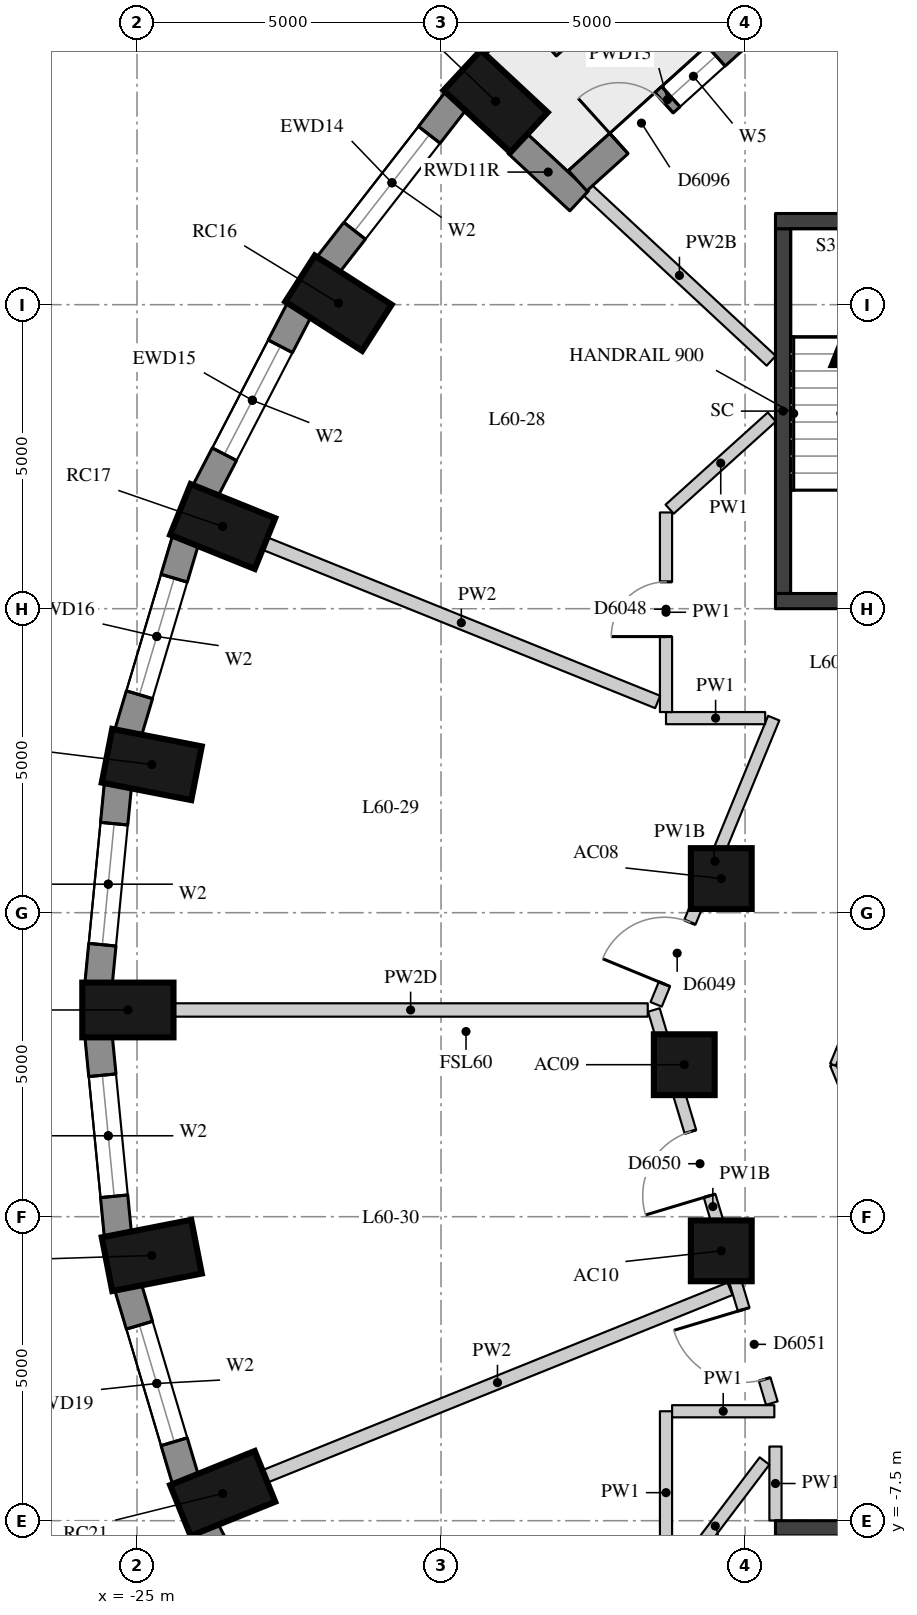
"""IFC4 building model, lengths in metres.
Left out: names, types, materials, properties, quantities, classifications, styles, units other than length and angle.
Written with IfcOpenShell. Run it as: python <this file> out.ifc"""

import sys

from ifc_helpers import new_model, si_unit, direction, frame, frame_2d, origin, origin_2d, place, context, subcontext, project, spatial, rectangle, extrude, element, fill, save


model = new_model("IFC4")
c1 = context("Model", 3, precision=1e-05, world=origin(), true_north=direction((0.0, 1.0)))
c2 = subcontext(c1, "Body", "Model", "MODEL_VIEW")
j1 = project(units=[si_unit("LENGTHUNIT", "METRE"), si_unit("PLANEANGLEUNIT", "RADIAN")], contexts=[c1])
p1 = place(None, origin())
s1 = spatial("IfcSite", under=j1, at=p1, CompositionType="ELEMENT")
p2 = place(p1, origin())
s2 = spatial("IfcBuilding", under=s1, at=p2, CompositionType="ELEMENT")
p3 = place(p2, frame((0.0, 0.0, 212.3)))
s3 = spatial("IfcBuildingStorey", under=s2, at=p3, CompositionType="ELEMENT", Elevation=212.3)
for number, where, z_axis, x_axis in (
    (1, (-19.102, 15.845, 0.0), (0.0, 0.0, 1.0), (-0.732, 0.681, 0.0)),
    (2, (-21.687, 12.525, 0.0), (0.0, 0.0, 1.0), (-0.842, 0.539, 0.0)),
    (3, (-23.591, 8.852, 0.0), (0.0, 0.0, 1.0), (-0.927, 0.374, 0.0)),
    (4, (-24.757, 4.937, 0.0), (0.0, 0.0, 1.0), (-0.981, 0.192, 0.0)),
    (5, (-25.15, 0.9, 0.0), (0.0, 0.0, 1.0), (-1.0, 0.0, 0.0)),
    (6, (-24.757, -3.137, 0.0), (0.0, 0.0, 1.0), (-0.981, -0.192, 0.0)),
    (7, (-23.591, -7.052, 0.0), (0.0, 0.0, 1.0), (-0.927, -0.374, 0.0)),
):
    element("IfcColumn", number, at=place(p3, frame(where, z_axis=z_axis, x_axis=x_axis)), inside=s3, PredefinedType="COLUMN", context=c2, shape_type="SweptSolid", body=[
        extrude(rectangle(XDim=1.5, YDim=0.9, at=origin_2d()), origin(), (0.0, 0.0, 1.0), 3.3),
    ])
for number, where, z_axis, x_axis in (
    (8, (-15.391, 3.062, 0.0), (0.0, 0.0, 1.0), (1.0, 0.0, 0.0)),
    (9, (-16.0, 0.0, 0.0), (0.0, 0.0, 1.0), (1.0, 0.0, 0.0)),
    (10, (-15.391, -3.062, 0.0), (0.0, 0.0, 1.0), (1.0, 0.0, 0.0)),
):
    element("IfcColumn", number, at=place(p3, frame(where, z_axis=z_axis, x_axis=x_axis)), inside=s3, PredefinedType="COLUMN", context=c2, shape_type="SweptSolid", body=[
        extrude(rectangle(XDim=1.0, YDim=1.0, at=origin_2d()), origin(), (0.0, 0.0, 1.0), 3.3),
    ])
p4 = place(p3, frame((-19.751, 15.861, 0.0), z_axis=(0.0, 0.0, 1.0), x_axis=(-0.614220816451, -0.789134201919, 0.0)))
e11 = element("IfcWall", 11, at=p4, inside=s3, PredefinedType="SOLIDWALL", context=c2, shape_type="SweptSolid", body=[
    extrude(rectangle(XDim=3.438, YDim=0.45, at=frame_2d((1.719, 0.0))), origin(), (0.0, 0.0, 1.0), 3.02),
])
p5 = place(p4, frame((0.719, 0.0, 0.4)))
e12 = element("IfcOpeningElement", 12, at=p5, cuts=e11, PredefinedType="OPENING", context=c2, shape_type="SweptSolid", body=[
    extrude(rectangle(XDim=2.0, YDim=1.75, at=frame_2d((1.0, 0.875))), frame((0.0, 0.235, 0.0), z_axis=(0.0, -1.0, 0.0), x_axis=(1.0, 0.0, 0.0)), (0.0, 0.0, 1.0), 0.47),
])
p6 = place(p3, frame((-22.327, 12.424, 0.0), z_axis=(0.0, 0.0, 1.0), x_axis=(-0.460232593174, -0.887798378113, 0.0)))
e13 = element("IfcWall", 13, at=p6, inside=s3, PredefinedType="SOLIDWALL", context=c2, shape_type="SweptSolid", body=[
    extrude(rectangle(XDim=3.371, YDim=0.45, at=frame_2d((1.685, 0.0))), origin(), (0.0, 0.0, 1.0), 3.02),
])
p7 = place(p6, frame((0.685, 0.0, 0.4)))
e14 = element("IfcOpeningElement", 14, at=p7, cuts=e13, PredefinedType="OPENING", context=c2, shape_type="SweptSolid", body=[
    extrude(rectangle(XDim=2.0, YDim=1.75, at=frame_2d((1.0, 0.875))), frame((0.0, 0.235, 0.0), z_axis=(0.0, -1.0, 0.0), x_axis=(1.0, 0.0, 0.0)), (0.0, 0.0, 1.0), 0.47),
])
p8 = place(p3, frame((-24.2, 8.634, 0.0), z_axis=(0.0, 0.0, 1.0), x_axis=(-0.285444972963, -0.958395099847, 0.0)))
e15 = element("IfcWall", 15, at=p8, inside=s3, PredefinedType="SOLIDWALL", context=c2, shape_type="SweptSolid", body=[
    extrude(rectangle(XDim=3.32, YDim=0.45, at=frame_2d((1.66, 0.0))), origin(), (0.0, 0.0, 1.0), 3.02),
])
p9 = place(p8, frame((0.66, 0.0, 0.4)))
e16 = element("IfcOpeningElement", 16, at=p9, cuts=e15, PredefinedType="OPENING", context=c2, shape_type="SweptSolid", body=[
    extrude(rectangle(XDim=2.0, YDim=1.75, at=frame_2d((1.0, 0.875))), frame((0.0, 0.235, 0.0), z_axis=(0.0, -1.0, 0.0), x_axis=(1.0, 0.0, 0.0)), (0.0, 0.0, 1.0), 0.47),
])
p10 = place(p3, frame((-25.313, 4.608, 0.0), z_axis=(0.0, 0.0, 1.0), x_axis=(-0.096824116835, -0.995301507283, 0.0)))
e17 = element("IfcWall", 17, at=p10, inside=s3, PredefinedType="SOLIDWALL", context=c2, shape_type="SweptSolid", body=[
    extrude(rectangle(XDim=3.293, YDim=0.45, at=frame_2d((1.646, 0.0))), origin(), (0.0, 0.0, 1.0), 3.02),
])
p11 = place(p10, frame((0.646, 0.0, 0.4)))
e18 = element("IfcOpeningElement", 18, at=p11, cuts=e17, PredefinedType="OPENING", context=c2, shape_type="SweptSolid", body=[
    extrude(rectangle(XDim=2.0, YDim=1.75, at=frame_2d((1.0, 0.875))), frame((0.0, 0.235, 0.0), z_axis=(0.0, -1.0, 0.0), x_axis=(1.0, 0.0, 0.0)), (0.0, 0.0, 1.0), 0.47),
])
p12 = place(p3, frame((-25.632, 0.47, 0.0), z_axis=(0.0, 0.0, 1.0), x_axis=(0.096816972749, -0.995302202242, 0.0)))
e19 = element("IfcWall", 19, at=p12, inside=s3, PredefinedType="SOLIDWALL", context=c2, shape_type="SweptSolid", body=[
    extrude(rectangle(XDim=3.293, YDim=0.45, at=frame_2d((1.646, 0.0))), origin(), (0.0, 0.0, 1.0), 3.02),
])
p13 = place(p12, frame((0.646, 0.0, 0.4)))
e20 = element("IfcOpeningElement", 20, at=p13, cuts=e19, PredefinedType="OPENING", context=c2, shape_type="SweptSolid", body=[
    extrude(rectangle(XDim=2.0, YDim=1.75, at=frame_2d((1.0, 0.875))), frame((0.0, 0.235, 0.0), z_axis=(0.0, -1.0, 0.0), x_axis=(1.0, 0.0, 0.0)), (0.0, 0.0, 1.0), 0.47),
])
p14 = place(p3, frame((-25.148, -3.652, 0.0), z_axis=(0.0, 0.0, 1.0), x_axis=(0.285444972963, -0.958395099847, 0.0)))
e21 = element("IfcWall", 21, at=p14, inside=s3, PredefinedType="SOLIDWALL", context=c2, shape_type="SweptSolid", body=[
    extrude(rectangle(XDim=3.32, YDim=0.45, at=frame_2d((1.66, 0.0))), origin(), (0.0, 0.0, 1.0), 3.02),
])
p15 = place(p14, frame((0.66, 0.0, 0.4)))
e22 = element("IfcOpeningElement", 22, at=p15, cuts=e21, PredefinedType="OPENING", context=c2, shape_type="SweptSolid", body=[
    extrude(rectangle(XDim=2.0, YDim=1.75, at=frame_2d((1.0, 0.875))), frame((0.0, 0.235, 0.0), z_axis=(0.0, -1.0, 0.0), x_axis=(1.0, 0.0, 0.0)), (0.0, 0.0, 1.0), 0.47),
])
p16 = place(p3, frame((-23.878, -7.632, 0.0), z_axis=(0.0, 0.0, 1.0), x_axis=(0.460232593174, -0.887798378113, 0.0)))
e23 = element("IfcWall", 23, at=p16, inside=s3, PredefinedType="SOLIDWALL", context=c2, shape_type="SweptSolid", body=[
    extrude(rectangle(XDim=3.371, YDim=0.45, at=frame_2d((1.685, 0.0))), origin(), (0.0, 0.0, 1.0), 3.02),
])
p17 = place(p16, frame((0.685, 0.0, 0.4)))
e24 = element("IfcOpeningElement", 24, at=p17, cuts=e23, PredefinedType="OPENING", context=c2, shape_type="SweptSolid", body=[
    extrude(rectangle(XDim=2.0, YDim=1.75, at=frame_2d((1.0, 0.875))), frame((0.0, 0.235, 0.0), z_axis=(0.0, -1.0, 0.0), x_axis=(1.0, 0.0, 0.0)), (0.0, 0.0, 1.0), 0.47),
])
p18 = place(p3, frame((-18.747, 15.155, 0.0), z_axis=(0.0, 0.0, 1.0), x_axis=(0.732349544388, -0.680928883831, 0.0)))
e25 = element("IfcWall", 25, at=p18, inside=s3, PredefinedType="SOLIDWALL", context=c2, shape_type="SweptSolid", body=[
    extrude(rectangle(XDim=1.391, YDim=0.45, at=frame_2d((0.696, 0.0))), origin(), (0.0, 0.0, 1.0), 2.57),
])
p19 = place(p3, frame((-14.799, 17.205, 0.0), z_axis=(0.0, 0.0, 1.0), x_axis=(-0.742488361714, -0.669858964798, 0.0)))
e26 = element("IfcWall", 26, at=p19, inside=s3, PredefinedType="SOLIDWALL", context=c2, shape_type="SweptSolid", body=[
    extrude(rectangle(XDim=3.98, YDim=0.45, at=frame_2d((1.99, 0.0))), origin(), (0.0, 0.0, 1.0), 3.02),
])
p20 = place(p19, frame((0.915, 0.0, 0.4)))
e27 = element("IfcOpeningElement", 27, at=p20, cuts=e26, PredefinedType="OPENING", context=c2, shape_type="SweptSolid", body=[
    extrude(rectangle(XDim=1.0, YDim=1.75, at=frame_2d((0.5, 0.875))), frame((0.0, 0.235, 0.0), z_axis=(0.0, -1.0, 0.0), x_axis=(1.0, 0.0, 0.0)), (0.0, 0.0, 1.0), 0.47),
])
p21 = place(p19, frame((2.065, 0.0, 0.0)))
e28 = element("IfcOpeningElement", 28, at=p21, cuts=e26, PredefinedType="OPENING", context=c2, shape_type="SweptSolid", body=[
    extrude(rectangle(XDim=1.0, YDim=2.15, at=frame_2d((0.5, 1.075))), frame((0.0, 0.235, 0.0), z_axis=(0.0, -1.0, 0.0), x_axis=(1.0, 0.0, 0.0)), (0.0, 0.0, 1.0), 0.47),
])
p22 = place(p3, frame((-17.0, 18.055, 0.0), z_axis=(0.0, 0.0, 1.0), x_axis=(-0.743422275143, -0.668822338758, 0.0)))
e29 = element("IfcWall", 29, at=p22, inside=s3, PredefinedType="USERDEFINED", context=c2, shape_type="SweptSolid", body=[
    extrude(rectangle(XDim=1.8, YDim=0.7, at=frame_2d((0.9, 0.0))), origin(), (0.0, 0.0, 1.0), 0.75),
])
p23 = place(p3, frame((-14.375, 7.75, -0.28), z_axis=(0.0, 0.0, 1.0), x_axis=(0.0, 1.0, 0.0)))
e30 = element("IfcWall", 30, at=p23, inside=s3, PredefinedType="SHEAR", context=c2, shape_type="SweptSolid", body=[
    extrude(rectangle(XDim=6.0, YDim=0.25, at=frame_2d((3.0, 0.0))), origin(), (0.0, 0.0, 1.0), 3.3),
])
for number, where, z_axis, x_axis in (
    (31, (-14.5, 13.875, -0.28), (0.0, 0.0, 1.0), (1.0, 0.0, 0.0)),
    (32, (-14.5, 7.625, -0.28), (0.0, 0.0, 1.0), (1.0, 0.0, 0.0)),
    (33, (-14.5, -7.625, -0.28), (0.0, 0.0, 1.0), (1.0, 0.0, 0.0)),
):
    element("IfcWall", number, at=place(p3, frame(where, z_axis=z_axis, x_axis=x_axis)), inside=s3, PredefinedType="SHEAR", context=c2, shape_type="SweptSolid", body=[
        extrude(rectangle(XDim=5.2, YDim=0.25, at=frame_2d((2.6, 0.0))), origin(), (0.0, 0.0, 1.0), 3.3),
    ])
p24 = place(p3, frame((-14.5, -7.496, 0.0), z_axis=(0.0, 0.0, 1.0), x_axis=(0.0, 1.0, 0.0)))
e34 = element("IfcWall", 34, at=p24, inside=s3, PredefinedType="PARTITIONING", context=c2, shape_type="SweptSolid", body=[
    extrude(rectangle(XDim=1.216, YDim=0.2, at=frame_2d((0.608, 0.0))), origin(), (0.0, 0.0, 1.0), 3.02),
])
p25 = place(p3, frame((-14.679, -6.518, 0.0), z_axis=(0.0, 0.0, 1.0), x_axis=(-0.603820908912, -0.797120009761, 0.0)))
e35 = element("IfcWall", 35, at=p25, inside=s3, PredefinedType="PARTITIONING", context=c2, shape_type="SweptSolid", body=[
    extrude(rectangle(XDim=2.684, YDim=0.2, at=frame_2d((1.342, 0.0))), origin(), (0.0, 0.0, 1.0), 3.02),
])
p26 = place(p3, frame((-16.3, -8.377, 0.0), z_axis=(0.0, 0.0, 1.0), x_axis=(0.0, 1.0, 0.0)))
e36 = element("IfcWall", 36, at=p26, inside=s3, PredefinedType="PARTITIONING", context=c2, shape_type="SweptSolid", body=[
    extrude(rectangle(XDim=2.677, YDim=0.2, at=frame_2d((1.339, 0.0))), origin(), (0.0, 0.0, 1.0), 3.02),
])
p27 = place(p3, frame((-16.2, -5.7, 0.0), z_axis=(0.0, 0.0, 1.0), x_axis=(1.0, 0.0, 0.0)))
e37 = element("IfcWall", 37, at=p27, inside=s3, PredefinedType="PARTITIONING", context=c2, shape_type="SweptSolid", body=[
    extrude(rectangle(XDim=1.681, YDim=0.2, at=frame_2d((0.841, 0.0))), origin(), (0.0, 0.0, 1.0), 3.02),
])
p28 = place(p3, frame((-14.56, -5.567, 0.0), z_axis=(0.0, 0.0, 1.0), x_axis=(-0.287410918602, 0.95780737305, 0.0)))
e38 = element("IfcWall", 38, at=p28, inside=s3, PredefinedType="PARTITIONING", context=c2, shape_type="SweptSolid", body=[
    extrude(rectangle(XDim=6.751, YDim=0.2, at=frame_2d((3.376, 0.0))), origin(), (0.0, 0.0, 1.0), 2.52),
])
p29 = place(p28, frame((3.561, 0.0, 0.0)))
e39 = element("IfcOpeningElement", 39, at=p29, cuts=e38, PredefinedType="OPENING", context=c2, shape_type="SweptSolid", body=[
    extrude(rectangle(XDim=1.1, YDim=2.1, at=frame_2d((0.55, 1.05))), frame((0.0, 0.11, 0.0), z_axis=(0.0, -1.0, 0.0), x_axis=(1.0, 0.0, 0.0)), (0.0, 0.0, 1.0), 0.22),
])
p30 = place(p28, frame((0.41, 0.0, 0.0)))
e40 = element("IfcOpeningElement", 40, at=p30, cuts=e38, PredefinedType="OPENING", context=c2, shape_type="SweptSolid", body=[
    extrude(rectangle(XDim=1.2, YDim=2.1, at=frame_2d((0.6, 1.05))), frame((0.0, 0.11, 0.0), z_axis=(0.0, -1.0, 0.0), x_axis=(1.0, 0.0, 0.0)), (0.0, 0.0, 1.0), 0.22),
])
p31 = place(p3, frame((-16.462, 0.993, 0.0), z_axis=(0.0, 0.0, 1.0), x_axis=(0.37991958703, 0.925019517303, 0.0)))
e41 = element("IfcWall", 41, at=p31, inside=s3, PredefinedType="PARTITIONING", context=c2, shape_type="SweptSolid", body=[
    extrude(rectangle(XDim=5.089, YDim=0.2, at=frame_2d((2.544, 0.0))), origin(), (0.0, 0.0, 1.0), 2.52),
])
p32 = place(p31, frame((0.36, 0.0, 0.0)))
e42 = element("IfcOpeningElement", 42, at=p32, cuts=e41, PredefinedType="OPENING", context=c2, shape_type="SweptSolid", body=[
    extrude(rectangle(XDim=1.1, YDim=2.1, at=frame_2d((0.55, 1.05))), frame((0.0, 0.11, 0.0), z_axis=(0.0, -1.0, 0.0), x_axis=(1.0, 0.0, 0.0)), (0.0, 0.0, 1.0), 0.22),
])
p33 = place(p3, frame((-14.669, 5.7, 0.0), z_axis=(0.0, 0.0, 1.0), x_axis=(-1.0, 0.0, 0.0)))
e43 = element("IfcWall", 43, at=p33, inside=s3, PredefinedType="PARTITIONING", context=c2, shape_type="SweptSolid", body=[
    extrude(rectangle(XDim=1.631, YDim=0.2, at=frame_2d((0.815, 0.0))), origin(), (0.0, 0.0, 1.0), 3.02),
])
p34 = place(p3, frame((-16.3, 5.8, 0.0), z_axis=(0.0, 0.0, 1.0), x_axis=(0.0, 1.0, 0.0)))
e44 = element("IfcWall", 44, at=p34, inside=s3, PredefinedType="PARTITIONING", context=c2, shape_type="SweptSolid", body=[
    extrude(rectangle(XDim=3.283, YDim=0.2, at=frame_2d((1.641, 0.0))), origin(), (0.0, 0.0, 1.0), 3.02),
])
p35 = place(p34, frame((1.241, 0.0, 0.0)))
e45 = element("IfcOpeningElement", 45, at=p35, cuts=e44, PredefinedType="OPENING", context=c2, shape_type="SweptSolid", body=[
    extrude(rectangle(XDim=0.9, YDim=2.1, at=frame_2d((0.45, 1.05))), frame((0.0, 0.11, 0.0), z_axis=(0.0, -1.0, 0.0), x_axis=(1.0, 0.0, 0.0)), (0.0, 0.0, 1.0), 0.22),
])
p36 = place(p3, frame((-16.24, 9.136, 0.0), z_axis=(0.0, 0.0, 1.0), x_axis=(0.74251608424, 0.66982823518, 0.0)))
e46 = element("IfcWall", 46, at=p36, inside=s3, PredefinedType="PARTITIONING", context=c2, shape_type="SweptSolid", body=[
    extrude(rectangle(XDim=2.264, YDim=0.2, at=frame_2d((1.132, 0.0))), origin(), (0.0, 0.0, 1.0), 3.02),
])
p37 = place(p3, frame((-17.589, 14.385, 0.0), z_axis=(0.0, 0.0, 1.0), x_axis=(0.732287016614, -0.680996127227, 0.0)))
e47 = element("IfcWall", 47, at=p37, inside=s3, PredefinedType="PARTITIONING", context=c2, shape_type="SweptSolid", body=[
    extrude(rectangle(XDim=4.122, YDim=0.22, at=frame_2d((2.061, 0.0))), origin(), (0.0, 0.0, 1.0), 2.57),
])
p38 = place(p3, frame((-22.896, 8.571, 0.0), z_axis=(0.0, 0.0, 1.0), x_axis=(0.927387137769, -0.374103056256, 0.0)))
e48 = element("IfcWall", 48, at=p38, inside=s3, PredefinedType="PARTITIONING", context=c2, shape_type="SweptSolid", body=[
    extrude(rectangle(XDim=6.964, YDim=0.22, at=frame_2d((3.482, 0.0))), origin(), (0.0, 0.0, 1.0), 3.02),
])
p39 = place(p3, frame((-24.4, 0.9, 0.0), z_axis=(0.0, 0.0, 1.0), x_axis=(1.0, 0.0, 0.0)))
e49 = element("IfcWall", 49, at=p39, inside=s3, PredefinedType="PARTITIONING", context=c2, shape_type="SweptSolid", body=[
    extrude(rectangle(XDim=7.8, YDim=0.22, at=frame_2d((3.9, 0.0))), origin(), (0.0, 0.0, 1.0), 2.47),
])
p40 = place(p3, frame((-22.896, -6.771, 0.0), z_axis=(0.0, 0.0, 1.0), x_axis=(0.92738233242, 0.374114968313, 0.0)))
e50 = element("IfcWall", 50, at=p40, inside=s3, PredefinedType="PARTITIONING", context=c2, shape_type="SweptSolid", body=[
    extrude(rectangle(XDim=8.246, YDim=0.22, at=frame_2d((4.123, 0.0))), origin(), (0.0, 0.0, 1.0), 3.02),
])
for number, where, z_axis, x_axis in (
    (51, (-11.927, -3.927, 0.0), (0.0, 0.0, 1.0), (-0.383, 0.924, 0.0)),
    (52, (-13.554, 0.0, 0.0), (0.0, 0.0, 1.0), (0.383, 0.924, 0.0)),
):
    element("IfcWall", number, at=place(p3, frame(where, z_axis=z_axis, x_axis=x_axis)), inside=s3, PredefinedType="PARTITIONING", context=c2, shape_type="SweptSolid", body=[
        extrude(rectangle(XDim=4.251, YDim=0.1, at=frame_2d((2.125, 0.0))), origin(), (0.0, 0.0, 1.0), 3.02),
    ])
p41 = place(p5, origin())
e53 = element("IfcWindow", 53, at=p41, inside=s3, PartitioningType="SINGLE_PANEL", PredefinedType="WINDOW", context=c2, shape_type="SweptSolid", body=[
    extrude(rectangle(XDim=2.0, YDim=1.75, at=frame_2d((1.0, 0.875))), frame((0.0, 0.035, 0.0), z_axis=(0.0, -1.0, 0.0), x_axis=(1.0, 0.0, 0.0)), (0.0, 0.0, 1.0), 0.06),
])
fill(e12, e53)
p42 = place(p7, origin())
e54 = element("IfcWindow", 54, at=p42, inside=s3, PartitioningType="SINGLE_PANEL", PredefinedType="WINDOW", context=c2, shape_type="SweptSolid", body=[
    extrude(rectangle(XDim=2.0, YDim=1.75, at=frame_2d((1.0, 0.875))), frame((0.0, 0.035, 0.0), z_axis=(0.0, -1.0, 0.0), x_axis=(1.0, 0.0, 0.0)), (0.0, 0.0, 1.0), 0.06),
])
fill(e14, e54)
p43 = place(p9, origin())
e55 = element("IfcWindow", 55, at=p43, inside=s3, PartitioningType="SINGLE_PANEL", PredefinedType="WINDOW", context=c2, shape_type="SweptSolid", body=[
    extrude(rectangle(XDim=2.0, YDim=1.75, at=frame_2d((1.0, 0.875))), frame((0.0, 0.035, 0.0), z_axis=(0.0, -1.0, 0.0), x_axis=(1.0, 0.0, 0.0)), (0.0, 0.0, 1.0), 0.06),
])
fill(e16, e55)
p44 = place(p11, origin())
e56 = element("IfcWindow", 56, at=p44, inside=s3, PartitioningType="SINGLE_PANEL", PredefinedType="WINDOW", context=c2, shape_type="SweptSolid", body=[
    extrude(rectangle(XDim=2.0, YDim=1.75, at=frame_2d((1.0, 0.875))), frame((0.0, 0.035, 0.0), z_axis=(0.0, -1.0, 0.0), x_axis=(1.0, 0.0, 0.0)), (0.0, 0.0, 1.0), 0.06),
])
fill(e18, e56)
p45 = place(p13, origin())
e57 = element("IfcWindow", 57, at=p45, inside=s3, PartitioningType="SINGLE_PANEL", PredefinedType="WINDOW", context=c2, shape_type="SweptSolid", body=[
    extrude(rectangle(XDim=2.0, YDim=1.75, at=frame_2d((1.0, 0.875))), frame((0.0, 0.035, 0.0), z_axis=(0.0, -1.0, 0.0), x_axis=(1.0, 0.0, 0.0)), (0.0, 0.0, 1.0), 0.06),
])
fill(e20, e57)
p46 = place(p15, origin())
e58 = element("IfcWindow", 58, at=p46, inside=s3, PartitioningType="SINGLE_PANEL", PredefinedType="WINDOW", context=c2, shape_type="SweptSolid", body=[
    extrude(rectangle(XDim=2.0, YDim=1.75, at=frame_2d((1.0, 0.875))), frame((0.0, 0.035, 0.0), z_axis=(0.0, -1.0, 0.0), x_axis=(1.0, 0.0, 0.0)), (0.0, 0.0, 1.0), 0.06),
])
fill(e22, e58)
p47 = place(p20, origin())
e59 = element("IfcWindow", 59, at=p47, inside=s3, PartitioningType="SINGLE_PANEL", PredefinedType="WINDOW", context=c2, shape_type="SweptSolid", body=[
    extrude(rectangle(XDim=1.0, YDim=1.75, at=frame_2d((0.5, 0.875))), frame((0.0, 0.035, 0.0), z_axis=(0.0, -1.0, 0.0), x_axis=(1.0, 0.0, 0.0)), (0.0, 0.0, 1.0), 0.06),
])
fill(e27, e59)
p48 = place(p21, frame((1.0, 0.0, 0.0), z_axis=(0.0, 0.0, 1.0), x_axis=(-1.0, 0.0, 0.0)))
e60 = element("IfcDoor", 60, at=p48, inside=s3, OperationType="SINGLE_SWING_LEFT", PredefinedType="DOOR", context=c2, shape_type="SweptSolid", body=[
    extrude(rectangle(XDim=1.0, YDim=2.15, at=frame_2d((0.5, 1.075))), frame((0.0, 0.075, 0.0), z_axis=(0.0, -1.0, 0.0), x_axis=(1.0, 0.0, 0.0)), (0.0, 0.0, 1.0), 0.05),
])
fill(e28, e60)
p49 = place(p35, origin())
e61 = element("IfcDoor", 61, at=p49, inside=s3, OperationType="SINGLE_SWING_LEFT", PredefinedType="DOOR", context=c2, shape_type="SweptSolid", body=[
    extrude(rectangle(XDim=0.9, YDim=2.1, at=frame_2d((0.45, 1.05))), frame((0.0, 0.025, 0.0), z_axis=(0.0, -1.0, 0.0), x_axis=(1.0, 0.0, 0.0)), (0.0, 0.0, 1.0), 0.05),
])
fill(e45, e61)
p50 = place(p32, origin())
e62 = element("IfcDoor", 62, at=p50, inside=s3, OperationType="SINGLE_SWING_LEFT", PredefinedType="DOOR", context=c2, shape_type="SweptSolid", body=[
    extrude(rectangle(XDim=1.1, YDim=2.1, at=frame_2d((0.55, 1.05))), frame((0.0, 0.025, 0.0), z_axis=(0.0, -1.0, 0.0), x_axis=(1.0, 0.0, 0.0)), (0.0, 0.0, 1.0), 0.05),
])
fill(e42, e62)
p51 = place(p29, origin())
e63 = element("IfcDoor", 63, at=p51, inside=s3, OperationType="SINGLE_SWING_LEFT", PredefinedType="DOOR", context=c2, shape_type="SweptSolid", body=[
    extrude(rectangle(XDim=1.1, YDim=2.1, at=frame_2d((0.55, 1.05))), frame((0.0, 0.025, 0.0), z_axis=(0.0, -1.0, 0.0), x_axis=(1.0, 0.0, 0.0)), (0.0, 0.0, 1.0), 0.05),
])
fill(e39, e63)
p52 = place(p30, origin())
e64 = element("IfcDoor", 64, at=p52, inside=s3, OperationType="SINGLE_SWING_RIGHT", PredefinedType="DOOR", context=c2, shape_type="SweptSolid", body=[
    extrude(rectangle(XDim=1.2, YDim=2.1, at=frame_2d((0.6, 1.05))), frame((0.0, 0.025, 0.0), z_axis=(0.0, -1.0, 0.0), x_axis=(1.0, 0.0, 0.0)), (0.0, 0.0, 1.0), 0.05),
])
fill(e40, e64)
save(model, sys.argv[1])
